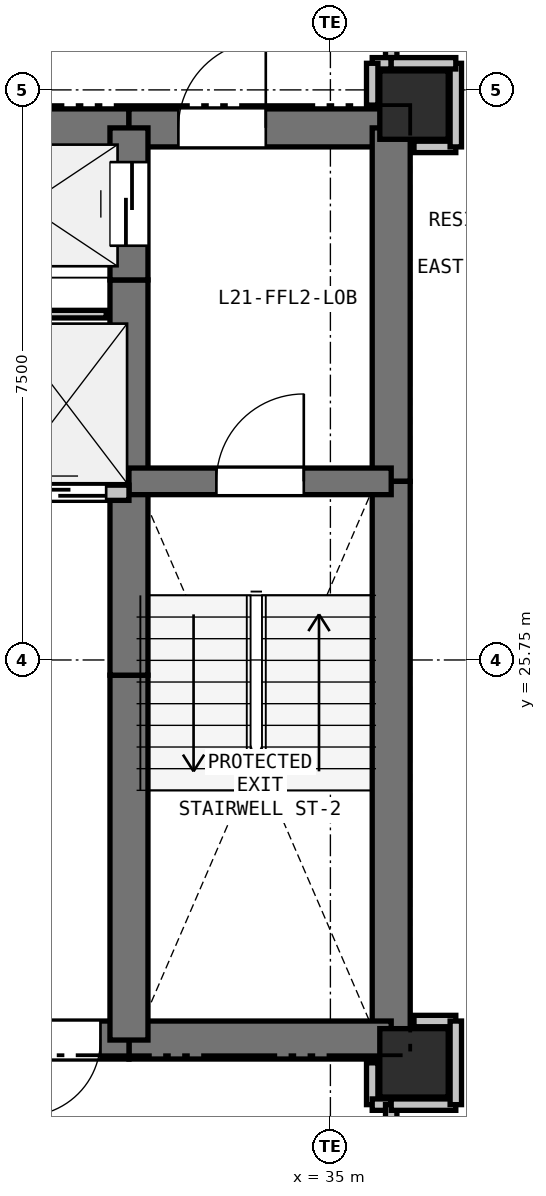
"""IFC4 building model, lengths in metres.
Left out: names, types, materials, properties, quantities, classifications, styles, units other than length and angle.
Written with IfcOpenShell. Run it as: python <this file> out.ifc"""

import sys

from ifc_helpers import new_model, si_unit, direction, frame, frame_2d, origin, origin_2d, place, context, subcontext, project, spatial, rectangle, extrude, element, fill, save


model = new_model("IFC4")
c1 = context("Model", 3, precision=1e-05, world=origin(), true_north=direction((0.0, 1.0)))
c2 = subcontext(c1, "Body", "Model", "MODEL_VIEW")
j1 = project(units=[si_unit("LENGTHUNIT", "METRE"), si_unit("PLANEANGLEUNIT", "RADIAN")], contexts=[c1])
p1 = place(None, origin())
s1 = spatial("IfcSite", under=j1, at=p1, CompositionType="ELEMENT")
p2 = place(p1, origin())
s2 = spatial("IfcBuilding", under=s1, at=p2, CompositionType="ELEMENT")
p3 = place(p2, frame((0.0, 0.0, 80.1)))
s3 = spatial("IfcBuildingStorey", under=s2, at=p3, CompositionType="ELEMENT", Elevation=80.1)
for number, where, z_axis, x_axis in (
    (1, (36.1, 33.05, 0.0), (0.0, 0.0, 1.0), (1.0, 0.0, 0.0)),
    (2, (36.1, 20.45, 0.0), (0.0, 0.0, 1.0), (1.0, 0.0, 0.0)),
):
    element("IfcColumn", number, at=place(p3, frame(where, z_axis=z_axis, x_axis=x_axis)), inside=s3, PredefinedType="COLUMN", context=c2, shape_type="SweptSolid", body=[
        extrude(rectangle(XDim=0.9, YDim=0.9, at=origin_2d()), origin(), (0.0, 0.0, 1.0), 3.3),
    ])
p4 = place(p3, frame((29.65, 32.75, 0.0), z_axis=(0.0, 0.0, 1.0), x_axis=(1.0, 0.0, 0.0)))
e3 = element("IfcWall", 3, at=p4, inside=s3, PredefinedType="SHEAR", context=c2, shape_type="SweptSolid", body=[
    extrude(rectangle(XDim=2.7, YDim=0.5, at=frame_2d((1.35, 0.0))), origin(), (0.0, 0.0, 1.0), 3.05),
])
p5 = place(p3, frame((32.35, 32.75, 0.0), z_axis=(0.0, 0.0, 1.0), x_axis=(1.0, 0.0, 0.0)))
e4 = element("IfcWall", 4, at=p5, inside=s3, PredefinedType="SHEAR", context=c2, shape_type="SweptSolid", body=[
    extrude(rectangle(XDim=3.45, YDim=0.5, at=frame_2d((1.725, 0.0))), origin(), (0.0, 0.0, 1.0), 3.05),
])
p6 = place(p5, frame((0.65, 0.0, 0.0)))
e5 = element("IfcOpeningElement", 5, at=p6, cuts=e4, PredefinedType="OPENING", context=c2, shape_type="SweptSolid", body=[
    extrude(rectangle(XDim=1.15, YDim=2.15, at=frame_2d((0.575, 1.075))), frame((0.0, 0.26, 0.0), z_axis=(0.0, -1.0, 0.0), x_axis=(1.0, 0.0, 0.0)), (0.0, 0.0, 1.0), 0.52),
])
p7 = place(p3, frame((35.8, 32.75, 0.0), z_axis=(0.0, 0.0, 1.0), x_axis=(0.0, -1.0, 0.0)))
e6 = element("IfcWall", 6, at=p7, inside=s3, PredefinedType="SHEAR", context=c2, shape_type="SweptSolid", body=[
    extrude(rectangle(XDim=4.65, YDim=0.5, at=frame_2d((2.325, 0.0))), origin(), (0.0, 0.0, 1.0), 3.05),
])
p8 = place(p3, frame((35.8, 28.1, 0.0), z_axis=(0.0, 0.0, 1.0), x_axis=(0.0, -1.0, 0.0)))
e7 = element("IfcWall", 7, at=p8, inside=s3, PredefinedType="SHEAR", context=c2, shape_type="SweptSolid", body=[
    extrude(rectangle(XDim=7.35, YDim=0.5, at=frame_2d((3.675, 0.0))), origin(), (0.0, 0.0, 1.0), 3.05),
])
p9 = place(p3, frame((35.8, 20.75, 0.0), z_axis=(0.0, 0.0, 1.0), x_axis=(-1.0, 0.0, 0.0)))
e8 = element("IfcWall", 8, at=p9, inside=s3, PredefinedType="SHEAR", context=c2, shape_type="SweptSolid", body=[
    extrude(rectangle(XDim=3.45, YDim=0.5, at=frame_2d((1.725, 0.0))), origin(), (0.0, 0.0, 1.0), 3.05),
])
p10 = place(p3, frame((32.35, 20.75, 0.0), z_axis=(0.0, 0.0, 1.0), x_axis=(-1.0, 0.0, 0.0)))
e9 = element("IfcWall", 9, at=p10, inside=s3, PredefinedType="SHEAR", context=c2, shape_type="SweptSolid", body=[
    extrude(rectangle(XDim=1.75, YDim=0.5, at=frame_2d((0.875, 0.0))), origin(), (0.0, 0.0, 1.0), 3.05),
])
p11 = place(p10, frame((0.375, 0.0, 0.0)))
e10 = element("IfcOpeningElement", 10, at=p11, cuts=e9, PredefinedType="OPENING", context=c2, shape_type="SweptSolid", body=[
    extrude(rectangle(XDim=1.0, YDim=2.15, at=frame_2d((0.5, 1.075))), frame((0.0, 0.26, 0.0), z_axis=(0.0, -1.0, 0.0), x_axis=(1.0, 0.0, 0.0)), (0.0, 0.0, 1.0), 0.52),
])
p12 = place(p3, frame((32.35, 20.75, 0.0), z_axis=(0.0, 0.0, 1.0), x_axis=(0.0, 1.0, 0.0)))
e11 = element("IfcWall", 11, at=p12, inside=s3, PredefinedType="SHEAR", context=c2, shape_type="SweptSolid", body=[
    extrude(rectangle(XDim=4.8, YDim=0.5, at=frame_2d((2.4, 0.0))), origin(), (0.0, 0.0, 1.0), 3.05),
])
p13 = place(p3, frame((32.35, 25.55, 0.0), z_axis=(0.0, 0.0, 1.0), x_axis=(0.0, 1.0, 0.0)))
e12 = element("IfcWall", 12, at=p13, inside=s3, PredefinedType="SHEAR", context=c2, shape_type="SweptSolid", body=[
    extrude(rectangle(XDim=2.4, YDim=0.5, at=frame_2d((1.2, 0.0))), origin(), (0.0, 0.0, 1.0), 3.05),
])
p14 = place(p3, frame((32.35, 27.95, 0.0), z_axis=(0.0, 0.0, 1.0), x_axis=(0.0, 1.0, 0.0)))
e13 = element("IfcWall", 13, at=p14, inside=s3, PredefinedType="SHEAR", context=c2, shape_type="SweptSolid", body=[
    extrude(rectangle(XDim=2.8, YDim=0.5, at=frame_2d((1.4, 0.0))), origin(), (0.0, 0.0, 1.0), 3.05),
])
p15 = place(p3, frame((32.35, 30.75, 0.0), z_axis=(0.0, 0.0, 1.0), x_axis=(0.0, 1.0, 0.0)))
e14 = element("IfcWall", 14, at=p15, inside=s3, PredefinedType="SHEAR", context=c2, shape_type="SweptSolid", body=[
    extrude(rectangle(XDim=2.0, YDim=0.5, at=frame_2d((1.0, 0.0))), origin(), (0.0, 0.0, 1.0), 3.05),
])
p16 = place(p15, frame((0.45, 0.0, 0.0)))
e15 = element("IfcOpeningElement", 15, at=p16, cuts=e14, PredefinedType="OPENING", context=c2, shape_type="SweptSolid", body=[
    extrude(rectangle(XDim=1.1, YDim=2.15, at=frame_2d((0.55, 1.075))), frame((0.0, 0.26, 0.0), z_axis=(0.0, -1.0, 0.0), x_axis=(1.0, 0.0, 0.0)), (0.0, 0.0, 1.0), 0.52),
])
p17 = place(p3, frame((32.35, 28.1, 0.0), z_axis=(0.0, 0.0, 1.0), x_axis=(1.0, 0.0, 0.0)))
e16 = element("IfcWall", 16, at=p17, inside=s3, PredefinedType="SHEAR", context=c2, shape_type="SweptSolid", body=[
    extrude(rectangle(XDim=3.45, YDim=0.35, at=frame_2d((1.725, 0.0))), origin(), (0.0, 0.0, 1.0), 3.05),
])
p18 = place(p17, frame((1.15, 0.0, 0.0)))
e17 = element("IfcOpeningElement", 17, at=p18, cuts=e16, PredefinedType="OPENING", context=c2, shape_type="SweptSolid", body=[
    extrude(rectangle(XDim=1.15, YDim=2.15, at=frame_2d((0.575, 1.075))), frame((0.0, 0.185, 0.0), z_axis=(0.0, -1.0, 0.0), x_axis=(1.0, 0.0, 0.0)), (0.0, 0.0, 1.0), 0.37),
])
p19 = place(p3, frame((27.4, 27.95, 0.0), z_axis=(0.0, 0.0, 1.0), x_axis=(1.0, 0.0, 0.0)))
e18 = element("IfcWall", 18, at=p19, inside=s3, PredefinedType="PARTITIONING", context=c2, shape_type="SweptSolid", body=[
    extrude(rectangle(XDim=4.95, YDim=0.2, at=frame_2d((2.475, 0.0))), origin(), (0.0, 0.0, 1.0), 3.05),
])
p20 = place(p19, frame((0.25, 0.0, 0.0)))
e19 = element("IfcOpeningElement", 19, at=p20, cuts=e18, PredefinedType="OPENING", context=c2, shape_type="SweptSolid", body=[
    extrude(rectangle(XDim=1.1, YDim=2.15, at=frame_2d((0.55, 1.075))), frame((0.0, 0.11, 0.0), z_axis=(0.0, -1.0, 0.0), x_axis=(1.0, 0.0, 0.0)), (0.0, 0.0, 1.0), 0.22),
])
p21 = place(p19, frame((1.9, 0.0, 0.0)))
e20 = element("IfcOpeningElement", 20, at=p21, cuts=e18, PredefinedType="OPENING", context=c2, shape_type="SweptSolid", body=[
    extrude(rectangle(XDim=1.1, YDim=2.15, at=frame_2d((0.55, 1.075))), frame((0.0, 0.11, 0.0), z_axis=(0.0, -1.0, 0.0), x_axis=(1.0, 0.0, 0.0)), (0.0, 0.0, 1.0), 0.22),
])
p22 = place(p19, frame((3.55, 0.0, 0.0)))
e21 = element("IfcOpeningElement", 21, at=p22, cuts=e18, PredefinedType="OPENING", context=c2, shape_type="SweptSolid", body=[
    extrude(rectangle(XDim=1.1, YDim=2.15, at=frame_2d((0.55, 1.075))), frame((0.0, 0.11, 0.0), z_axis=(0.0, -1.0, 0.0), x_axis=(1.0, 0.0, 0.0)), (0.0, 0.0, 1.0), 0.22),
])
p23 = place(p3, frame((32.05, 30.3, 0.0), z_axis=(0.0, 0.0, 1.0), x_axis=(-1.0, 0.0, 0.0)))
e22 = element("IfcWall", 22, at=p23, inside=s3, PredefinedType="PARTITIONING", context=c2, shape_type="SweptSolid", body=[
    extrude(rectangle(XDim=1.35, YDim=0.1, at=frame_2d((0.675, 0.0))), origin(), (0.0, 0.0, 1.0), 3.05),
])
p24 = place(p3, frame((35.55, 20.45, 0.0), z_axis=(0.0, 0.0, 1.0), x_axis=(0.0, -1.0, 0.0)))
e23 = element("IfcWall", 23, at=p24, inside=s3, PredefinedType="PARTITIONING", context=c2, shape_type="SweptSolid", body=[
    extrude(rectangle(XDim=0.55, YDim=0.15, at=frame_2d((0.275, 0.0))), origin(), (0.0, 0.0, 1.0), 2.498),
])
p25 = place(p3, frame((35.55, 19.9, 0.0), z_axis=(0.0, 0.0, 1.0), x_axis=(1.0, 0.0, 0.0)))
e24 = element("IfcWall", 24, at=p25, inside=s3, PredefinedType="PARTITIONING", context=c2, shape_type="SweptSolid", body=[
    extrude(rectangle(XDim=0.25, YDim=0.15, at=frame_2d((0.125, 0.0))), origin(), (0.0, 0.0, 1.0), 3.05),
])
p26 = place(p3, frame((35.8, 19.9, 0.0), z_axis=(0.0, 0.0, 1.0), x_axis=(0.0, -1.0, 0.0)))
e25 = element("IfcWall", 25, at=p26, inside=s3, PredefinedType="PARTITIONING", context=c2, shape_type="SweptSolid", body=[
    extrude(rectangle(XDim=1.75, YDim=0.15, at=frame_2d((0.875, 0.0))), origin(), (0.0, 0.0, 1.0), 3.05),
])
p27 = place(p26, frame((0.375, 0.0, 0.0)))
e26 = element("IfcOpeningElement", 26, at=p27, cuts=e25, PredefinedType="OPENING", context=c2, shape_type="SweptSolid", body=[
    extrude(rectangle(XDim=1.0, YDim=2.15, at=frame_2d((0.5, 1.075))), frame((0.0, 0.085, 0.0), z_axis=(0.0, -1.0, 0.0), x_axis=(1.0, 0.0, 0.0)), (0.0, 0.0, 1.0), 0.17),
])
p28 = place(p3, frame((35.8, 35.35, 0.0), z_axis=(0.0, 0.0, 1.0), x_axis=(0.0, -1.0, 0.0)))
e27 = element("IfcWall", 27, at=p28, inside=s3, PredefinedType="PARTITIONING", context=c2, shape_type="SweptSolid", body=[
    extrude(rectangle(XDim=1.75, YDim=0.15, at=frame_2d((0.875, 0.0))), origin(), (0.0, 0.0, 1.0), 3.05),
])
p29 = place(p28, frame((0.375, 0.0, 0.0)))
e28 = element("IfcOpeningElement", 28, at=p29, cuts=e27, PredefinedType="OPENING", context=c2, shape_type="SweptSolid", body=[
    extrude(rectangle(XDim=1.0, YDim=2.15, at=frame_2d((0.5, 1.075))), frame((0.0, 0.085, 0.0), z_axis=(0.0, -1.0, 0.0), x_axis=(1.0, 0.0, 0.0)), (0.0, 0.0, 1.0), 0.17),
])
p30 = place(p3, frame((35.8, 33.6, 0.0), z_axis=(0.0, 0.0, 1.0), x_axis=(-1.0, 0.0, 0.0)))
e29 = element("IfcWall", 29, at=p30, inside=s3, PredefinedType="PARTITIONING", context=c2, shape_type="SweptSolid", body=[
    extrude(rectangle(XDim=0.25, YDim=0.15, at=frame_2d((0.125, 0.0))), origin(), (0.0, 0.0, 1.0), 3.05),
])
p31 = place(p3, frame((35.55, 33.6, 0.0), z_axis=(0.0, 0.0, 1.0), x_axis=(0.0, -1.0, 0.0)))
e30 = element("IfcWall", 30, at=p31, inside=s3, PredefinedType="PARTITIONING", context=c2, shape_type="SweptSolid", body=[
    extrude(rectangle(XDim=0.55, YDim=0.15, at=frame_2d((0.275, 0.0))), origin(), (0.0, 0.0, 1.0), 2.498),
])
for number, where, z_axis, x_axis in (
    (31, (36.65, 21.0, 0.0), (0.0, 0.0, 1.0), (-1.0, 0.0, 0.0)),
    (32, (36.1, 32.5, 0.0), (0.0, 0.0, 1.0), (1.0, 0.0, 0.0)),
):
    element("IfcWall", number, at=place(p3, frame(where, z_axis=z_axis, x_axis=x_axis)), inside=s3, PredefinedType="PARTITIONING", context=c2, shape_type="SweptSolid", body=[
        extrude(rectangle(XDim=0.55, YDim=0.15, at=frame_2d((0.275, 0.0))), origin(), (0.0, 0.0, 1.0), 2.498),
    ])
p32 = place(p3, frame((36.65, 32.5, 0.0), z_axis=(0.0, 0.0, 1.0), x_axis=(0.0, 1.0, 0.0)))
e33 = element("IfcWall", 33, at=p32, inside=s3, PredefinedType="PARTITIONING", context=c2, shape_type="SweptSolid", body=[
    extrude(rectangle(XDim=1.1, YDim=0.15, at=frame_2d((0.55, 0.0))), origin(), (0.0, 0.0, 1.0), 2.423),
])
for number, where, z_axis, x_axis in (
    (34, (36.65, 33.6, 0.0), (0.0, 0.0, 1.0), (-1.0, 0.0, 0.0)),
    (35, (35.8, 19.9, 0.0), (0.0, 0.0, 1.0), (1.0, 0.0, 0.0)),
):
    element("IfcWall", number, at=place(p3, frame(where, z_axis=z_axis, x_axis=x_axis)), inside=s3, PredefinedType="PARTITIONING", context=c2, shape_type="SweptSolid", body=[
        extrude(rectangle(XDim=0.85, YDim=0.15, at=frame_2d((0.425, 0.0))), origin(), (0.0, 0.0, 1.0), 2.423),
    ])
p33 = place(p3, frame((36.65, 19.9, 0.0), z_axis=(0.0, 0.0, 1.0), x_axis=(0.0, 1.0, 0.0)))
e36 = element("IfcWall", 36, at=p33, inside=s3, PredefinedType="PARTITIONING", context=c2, shape_type="SweptSolid", body=[
    extrude(rectangle(XDim=1.1, YDim=0.15, at=frame_2d((0.55, 0.0))), origin(), (0.0, 0.0, 1.0), 3.05),
])
p34 = place(p22, origin())
e37 = element("IfcDoor", 37, at=p34, inside=s3, OperationType="SLIDING_TO_LEFT", PredefinedType="DOOR", context=c2, shape_type="SweptSolid", body=[
    extrude(rectangle(XDim=1.1, YDim=2.15, at=frame_2d((0.55, 1.075))), frame((0.0, 0.025, 0.0), z_axis=(0.0, -1.0, 0.0), x_axis=(1.0, 0.0, 0.0)), (0.0, 0.0, 1.0), 0.05),
])
fill(e21, e37)
p35 = place(p11, origin())
e38 = element("IfcDoor", 38, at=p35, inside=s3, OperationType="SINGLE_SWING_RIGHT", PredefinedType="DOOR", context=c2, shape_type="SweptSolid", body=[
    extrude(rectangle(XDim=1.0, YDim=2.15, at=frame_2d((0.5, 1.075))), frame((0.0, 0.025, 0.0), z_axis=(0.0, -1.0, 0.0), x_axis=(1.0, 0.0, 0.0)), (0.0, 0.0, 1.0), 0.05),
])
fill(e10, e38)
p36 = place(p16, origin())
e39 = element("IfcDoor", 39, at=p36, inside=s3, OperationType="SLIDING_TO_LEFT", PredefinedType="DOOR", context=c2, shape_type="SweptSolid", body=[
    extrude(rectangle(XDim=1.1, YDim=2.15, at=frame_2d((0.55, 1.075))), frame((0.0, 0.025, 0.0), z_axis=(0.0, -1.0, 0.0), x_axis=(1.0, 0.0, 0.0)), (0.0, 0.0, 1.0), 0.05),
])
fill(e15, e39)
p37 = place(p18, origin())
e40 = element("IfcDoor", 40, at=p37, inside=s3, OperationType="SINGLE_SWING_RIGHT", PredefinedType="DOOR", context=c2, shape_type="SweptSolid", body=[
    extrude(rectangle(XDim=1.15, YDim=2.15, at=frame_2d((0.575, 1.075))), frame((0.0, 0.025, 0.0), z_axis=(0.0, -1.0, 0.0), x_axis=(1.0, 0.0, 0.0)), (0.0, 0.0, 1.0), 0.05),
])
fill(e17, e40)
p38 = place(p6, origin())
e41 = element("IfcDoor", 41, at=p38, inside=s3, OperationType="SINGLE_SWING_RIGHT", PredefinedType="DOOR", context=c2, shape_type="SweptSolid", body=[
    extrude(rectangle(XDim=1.15, YDim=2.15, at=frame_2d((0.575, 1.075))), frame((0.0, 0.025, 0.0), z_axis=(0.0, -1.0, 0.0), x_axis=(1.0, 0.0, 0.0)), (0.0, 0.0, 1.0), 0.05),
])
fill(e5, e41)
save(model, sys.argv[1])
